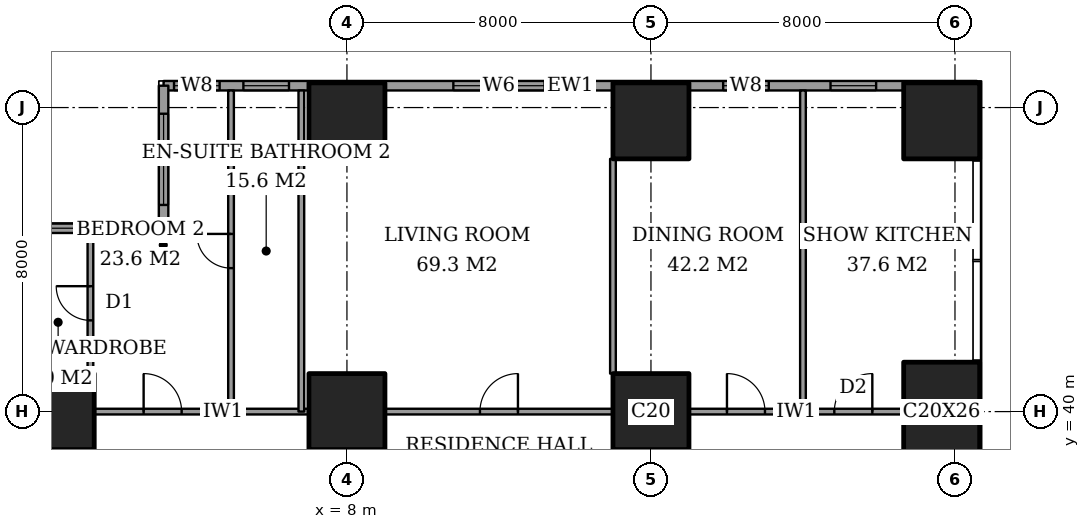
"""IFC4 building model, lengths in metres.
Left out: names, types, materials, properties, quantities, classifications, styles, units other than length and angle.
Written with IfcOpenShell. Run it as: python <this file> out.ifc"""

import sys

from ifc_helpers import new_model, si_unit, direction, frame, frame_2d, origin, origin_2d, place, context, subcontext, project, spatial, rectangle, extrude, element, fill, save


model = new_model("IFC4")
c1 = context("Model", 3, precision=1e-05, world=origin(), true_north=direction((0.0, 1.0)))
c2 = subcontext(c1, "Body", "Model", "MODEL_VIEW")
j1 = project(units=[si_unit("LENGTHUNIT", "METRE"), si_unit("PLANEANGLEUNIT", "RADIAN")], contexts=[c1])
p1 = place(None, origin())
s1 = spatial("IfcSite", under=j1, at=p1, CompositionType="ELEMENT")
p2 = place(p1, origin())
s2 = spatial("IfcBuilding", under=s1, at=p2, CompositionType="ELEMENT")
p3 = place(p2, frame((0.0, 0.0, 65.6)))
s3 = spatial("IfcBuildingStorey", under=s2, at=p3, CompositionType="ELEMENT", Elevation=65.6)
for number, where, z_axis, x_axis in (
    (1, (0.35, 40.0, 0.0), (0.0, 0.0, 1.0), (1.0, 0.0, 0.0)),
    (2, (8.0, 40.0, 0.0), (0.0, 0.0, 1.0), (1.0, 0.0, 0.0)),
    (3, (8.0, 47.65, 0.0), (0.0, 0.0, 1.0), (1.0, 0.0, 0.0)),
    (4, (16.0, 40.0, 0.0), (0.0, 0.0, 1.0), (1.0, 0.0, 0.0)),
    (5, (16.0, 47.65, 0.0), (0.0, 0.0, 1.0), (1.0, 0.0, 0.0)),
):
    element("IfcColumn", number, at=place(p3, frame(where, z_axis=z_axis, x_axis=x_axis)), inside=s3, PredefinedType="COLUMN", context=c2, shape_type="SweptSolid", body=[
        extrude(rectangle(XDim=2.0, YDim=2.0, at=origin_2d()), origin(), (0.0, 0.0, 1.0), 3.6),
    ])
p4 = place(p3, frame((23.65, 40.0, 0.0), z_axis=(0.0, 0.0, 1.0), x_axis=(1.0, 0.0, 0.0)))
e6 = element("IfcColumn", 6, at=p4, inside=s3, PredefinedType="COLUMN", context=c2, shape_type="SweptSolid", body=[
    extrude(rectangle(XDim=2.0, YDim=2.6, at=origin_2d()), origin(), (0.0, 0.0, 1.0), 3.6),
])
p5 = place(p3, frame((23.65, 47.65, 0.0), z_axis=(0.0, 0.0, 1.0), x_axis=(1.0, 0.0, 0.0)))
e7 = element("IfcColumn", 7, at=p5, inside=s3, PredefinedType="COLUMN", context=c2, shape_type="SweptSolid", body=[
    extrude(rectangle(XDim=2.0, YDim=2.0, at=origin_2d()), origin(), (0.0, 0.0, 1.0), 3.6),
])
p6 = place(p3, frame((24.575, 48.575, 0.0), z_axis=(0.0, 0.0, 1.0), x_axis=(-1.0, 0.0, 0.0)))
e8 = element("IfcWall", 8, at=p6, inside=s3, PredefinedType="SOLIDWALL", context=c2, shape_type="SweptSolid", body=[
    extrude(rectangle(XDim=21.4, YDim=0.25, at=frame_2d((10.7, 0.0))), origin(), (0.0, 0.0, 1.0), 3.6),
])
p7 = place(p6, frame((2.65, 0.0, 0.6)))
e9 = element("IfcOpeningElement", 9, at=p7, cuts=e8, PredefinedType="OPENING", context=c2, shape_type="SweptSolid", body=[
    extrude(rectangle(XDim=1.2, YDim=2.0, at=frame_2d((0.6, 1.0))), frame((0.0, 0.135, 0.0), z_axis=(0.0, -1.0, 0.0), x_axis=(1.0, 0.0, 0.0)), (0.0, 0.0, 1.0), 0.27),
])
p8 = place(p6, frame((5.475, 0.0, 0.6)))
e10 = element("IfcOpeningElement", 10, at=p8, cuts=e8, PredefinedType="OPENING", context=c2, shape_type="SweptSolid", body=[
    extrude(rectangle(XDim=1.2, YDim=2.0, at=frame_2d((0.6, 1.0))), frame((0.0, 0.135, 0.0), z_axis=(0.0, -1.0, 0.0), x_axis=(1.0, 0.0, 0.0)), (0.0, 0.0, 1.0), 0.27),
])
p9 = place(p6, frame((11.375, 0.0, 0.6)))
e11 = element("IfcOpeningElement", 11, at=p9, cuts=e8, PredefinedType="OPENING", context=c2, shape_type="SweptSolid", body=[
    extrude(rectangle(XDim=2.4, YDim=2.0, at=frame_2d((1.2, 1.0))), frame((0.0, 0.135, 0.0), z_axis=(0.0, -1.0, 0.0), x_axis=(1.0, 0.0, 0.0)), (0.0, 0.0, 1.0), 0.27),
])
p10 = place(p6, frame((18.1, 0.0, 0.6)))
e12 = element("IfcOpeningElement", 12, at=p10, cuts=e8, PredefinedType="OPENING", context=c2, shape_type="SweptSolid", body=[
    extrude(rectangle(XDim=1.2, YDim=2.0, at=frame_2d((0.6, 1.0))), frame((0.0, 0.135, 0.0), z_axis=(0.0, -1.0, 0.0), x_axis=(1.0, 0.0, 0.0)), (0.0, 0.0, 1.0), 0.27),
])
p11 = place(p6, frame((19.925, 0.0, 0.6)))
e13 = element("IfcOpeningElement", 13, at=p11, cuts=e8, PredefinedType="OPENING", context=c2, shape_type="SweptSolid", body=[
    extrude(rectangle(XDim=1.2, YDim=2.0, at=frame_2d((0.6, 1.0))), frame((0.0, 0.135, 0.0), z_axis=(0.0, -1.0, 0.0), x_axis=(1.0, 0.0, 0.0)), (0.0, 0.0, 1.0), 0.27),
])
p12 = place(p3, frame((3.175, 48.575, 0.0), z_axis=(0.0, 0.0, 1.0), x_axis=(0.0, -1.0, 0.0)))
e14 = element("IfcWall", 14, at=p12, inside=s3, PredefinedType="SOLIDWALL", context=c2, shape_type="SweptSolid", body=[
    extrude(rectangle(XDim=3.75, YDim=0.25, at=frame_2d((1.875, 0.0))), origin(), (0.0, 0.0, 1.0), 3.6),
])
p13 = place(p12, frame((0.738, 0.0, 0.6)))
e15 = element("IfcOpeningElement", 15, at=p13, cuts=e14, PredefinedType="OPENING", context=c2, shape_type="SweptSolid", body=[
    extrude(rectangle(XDim=2.4, YDim=2.0, at=frame_2d((1.2, 1.0))), frame((0.0, 0.135, 0.0), z_axis=(0.0, -1.0, 0.0), x_axis=(1.0, 0.0, 0.0)), (0.0, 0.0, 1.0), 0.27),
])
p14 = place(p3, frame((3.175, 44.825, 0.0), z_axis=(0.0, 0.0, 1.0), x_axis=(-1.0, 0.0, 0.0)))
e16 = element("IfcWall", 16, at=p14, inside=s3, PredefinedType="SOLIDWALL", context=c2, shape_type="SweptSolid", body=[
    extrude(rectangle(XDim=3.75, YDim=0.25, at=frame_2d((1.875, 0.0))), origin(), (0.0, 0.0, 1.0), 3.6),
])
p15 = place(p14, frame((0.363, 0.0, 0.6)))
e17 = element("IfcOpeningElement", 17, at=p15, cuts=e16, PredefinedType="OPENING", context=c2, shape_type="SweptSolid", body=[
    extrude(rectangle(XDim=1.2, YDim=2.0, at=frame_2d((0.6, 1.0))), frame((0.0, 0.135, 0.0), z_axis=(0.0, -1.0, 0.0), x_axis=(1.0, 0.0, 0.0)), (0.0, 0.0, 1.0), 0.27),
])
p16 = place(p14, frame((2.25, 0.0, 0.6)))
e18 = element("IfcOpeningElement", 18, at=p16, cuts=e16, PredefinedType="OPENING", context=c2, shape_type="SweptSolid", body=[
    extrude(rectangle(XDim=1.2, YDim=2.0, at=frame_2d((0.6, 1.0))), frame((0.0, 0.135, 0.0), z_axis=(0.0, -1.0, 0.0), x_axis=(1.0, 0.0, 0.0)), (0.0, 0.0, 1.0), 0.27),
])
p17 = place(p3, frame((1.35, 40.0, 0.0), z_axis=(0.0, 0.0, 1.0), x_axis=(1.0, 0.0, 0.0)))
e19 = element("IfcWall", 19, at=p17, inside=s3, PredefinedType="PARTITIONING", context=c2, shape_type="SweptSolid", body=[
    extrude(rectangle(XDim=5.65, YDim=0.15, at=frame_2d((2.825, 0.0))), origin(), (0.0, 0.0, 1.0), 3.35),
])
p18 = place(p17, frame((1.3, 0.0, 0.0)))
e20 = element("IfcOpeningElement", 20, at=p18, cuts=e19, PredefinedType="OPENING", context=c2, shape_type="SweptSolid", body=[
    extrude(rectangle(XDim=1.0, YDim=2.1, at=frame_2d((0.5, 1.05))), frame((0.0, 0.085, 0.0), z_axis=(0.0, -1.0, 0.0), x_axis=(1.0, 0.0, 0.0)), (0.0, 0.0, 1.0), 0.17),
])
p19 = place(p3, frame((9.0, 40.0, 0.0), z_axis=(0.0, 0.0, 1.0), x_axis=(1.0, 0.0, 0.0)))
e21 = element("IfcWall", 21, at=p19, inside=s3, PredefinedType="PARTITIONING", context=c2, shape_type="SweptSolid", body=[
    extrude(rectangle(XDim=6.0, YDim=0.15, at=frame_2d((3.0, 0.0))), origin(), (0.0, 0.0, 1.0), 3.35),
])
p20 = place(p19, frame((2.5, 0.0, 0.0)))
e22 = element("IfcOpeningElement", 22, at=p20, cuts=e21, PredefinedType="OPENING", context=c2, shape_type="SweptSolid", body=[
    extrude(rectangle(XDim=1.0, YDim=2.1, at=frame_2d((0.5, 1.05))), frame((0.0, 0.085, 0.0), z_axis=(0.0, -1.0, 0.0), x_axis=(1.0, 0.0, 0.0)), (0.0, 0.0, 1.0), 0.17),
])
p21 = place(p3, frame((17.0, 40.0, 0.0), z_axis=(0.0, 0.0, 1.0), x_axis=(1.0, 0.0, 0.0)))
e23 = element("IfcWall", 23, at=p21, inside=s3, PredefinedType="PARTITIONING", context=c2, shape_type="SweptSolid", body=[
    extrude(rectangle(XDim=5.65, YDim=0.15, at=frame_2d((2.825, 0.0))), origin(), (0.0, 0.0, 1.0), 3.35),
])
p22 = place(p21, frame((1.0, 0.0, 0.0)))
e24 = element("IfcOpeningElement", 24, at=p22, cuts=e23, PredefinedType="OPENING", context=c2, shape_type="SweptSolid", body=[
    extrude(rectangle(XDim=1.0, YDim=2.1, at=frame_2d((0.5, 1.05))), frame((0.0, 0.085, 0.0), z_axis=(0.0, -1.0, 0.0), x_axis=(1.0, 0.0, 0.0)), (0.0, 0.0, 1.0), 0.17),
])
p23 = place(p21, frame((3.825, 0.0, 0.0)))
e25 = element("IfcOpeningElement", 25, at=p23, cuts=e23, PredefinedType="OPENING", context=c2, shape_type="SweptSolid", body=[
    extrude(rectangle(XDim=1.0, YDim=2.1, at=frame_2d((0.5, 1.05))), frame((0.0, 0.085, 0.0), z_axis=(0.0, -1.0, 0.0), x_axis=(1.0, 0.0, 0.0)), (0.0, 0.0, 1.0), 0.17),
])
p24 = place(p3, frame((1.25, 41.0, 0.0), z_axis=(0.0, 0.0, 1.0), x_axis=(0.0, 1.0, 0.0)))
e26 = element("IfcWall", 26, at=p24, inside=s3, PredefinedType="PARTITIONING", context=c2, shape_type="SweptSolid", body=[
    extrude(rectangle(XDim=3.7, YDim=0.15, at=frame_2d((1.85, 0.0))), origin(), (0.0, 0.0, 1.0), 3.35),
])
p25 = place(p24, frame((1.4, 0.0, 0.0)))
e27 = element("IfcOpeningElement", 27, at=p25, cuts=e26, PredefinedType="OPENING", context=c2, shape_type="SweptSolid", body=[
    extrude(rectangle(XDim=0.9, YDim=2.1, at=frame_2d((0.45, 1.05))), frame((0.0, 0.085, 0.0), z_axis=(0.0, -1.0, 0.0), x_axis=(1.0, 0.0, 0.0)), (0.0, 0.0, 1.0), 0.17),
])
p26 = place(p3, frame((4.95, 40.0, 0.0), z_axis=(0.0, 0.0, 1.0), x_axis=(0.0, 1.0, 0.0)))
e28 = element("IfcWall", 28, at=p26, inside=s3, PredefinedType="PARTITIONING", context=c2, shape_type="SweptSolid", body=[
    extrude(rectangle(XDim=8.45, YDim=0.15, at=frame_2d((4.225, 0.0))), origin(), (0.0, 0.0, 1.0), 3.35),
])
p27 = place(p26, frame((3.775, 0.0, 0.0)))
e29 = element("IfcOpeningElement", 29, at=p27, cuts=e28, PredefinedType="OPENING", context=c2, shape_type="SweptSolid", body=[
    extrude(rectangle(XDim=0.9, YDim=2.1, at=frame_2d((0.45, 1.05))), frame((0.0, 0.085, 0.0), z_axis=(0.0, -1.0, 0.0), x_axis=(1.0, 0.0, 0.0)), (0.0, 0.0, 1.0), 0.17),
])
p28 = place(p3, frame((6.8, 40.0, 0.0), z_axis=(0.0, 0.0, 1.0), x_axis=(0.0, 1.0, 0.0)))
e30 = element("IfcWall", 30, at=p28, inside=s3, PredefinedType="PARTITIONING", context=c2, shape_type="SweptSolid", body=[
    extrude(rectangle(XDim=8.45, YDim=0.15, at=frame_2d((4.225, 0.0))), origin(), (0.0, 0.0, 1.0), 3.35),
])
p29 = place(p3, frame((15.0, 41.0, 0.0), z_axis=(0.0, 0.0, 1.0), x_axis=(0.0, 1.0, 0.0)))
e31 = element("IfcWall", 31, at=p29, inside=s3, PredefinedType="PARTITIONING", context=c2, shape_type="SweptSolid", body=[
    extrude(rectangle(XDim=5.65, YDim=0.15, at=frame_2d((2.825, 0.0))), origin(), (0.0, 0.0, 1.0), 3.35),
])
p30 = place(p3, frame((20.0, 40.0, 0.0), z_axis=(0.0, 0.0, 1.0), x_axis=(0.0, 1.0, 0.0)))
e32 = element("IfcWall", 32, at=p30, inside=s3, PredefinedType="PARTITIONING", context=c2, shape_type="SweptSolid", body=[
    extrude(rectangle(XDim=8.45, YDim=0.15, at=frame_2d((4.225, 0.0))), origin(), (0.0, 0.0, 1.0), 3.35),
])
p31 = place(p7, origin())
e33 = element("IfcWindow", 33, at=p31, inside=s3, PartitioningType="SINGLE_PANEL", PredefinedType="WINDOW", context=c2, shape_type="SweptSolid", body=[
    extrude(rectangle(XDim=1.2, YDim=2.0, at=frame_2d((0.6, 1.0))), frame((0.0, 0.03, 0.0), z_axis=(0.0, -1.0, 0.0), x_axis=(1.0, 0.0, 0.0)), (0.0, 0.0, 1.0), 0.06),
])
fill(e9, e33)
p32 = place(p8, origin())
e34 = element("IfcWindow", 34, at=p32, inside=s3, PartitioningType="SINGLE_PANEL", PredefinedType="WINDOW", context=c2, shape_type="SweptSolid", body=[
    extrude(rectangle(XDim=1.2, YDim=2.0, at=frame_2d((0.6, 1.0))), frame((0.0, 0.03, 0.0), z_axis=(0.0, -1.0, 0.0), x_axis=(1.0, 0.0, 0.0)), (0.0, 0.0, 1.0), 0.06),
])
fill(e10, e34)
p33 = place(p9, origin())
e35 = element("IfcWindow", 35, at=p33, inside=s3, PartitioningType="SINGLE_PANEL", PredefinedType="WINDOW", context=c2, shape_type="SweptSolid", body=[
    extrude(rectangle(XDim=2.4, YDim=2.0, at=frame_2d((1.2, 1.0))), frame((0.0, 0.03, 0.0), z_axis=(0.0, -1.0, 0.0), x_axis=(1.0, 0.0, 0.0)), (0.0, 0.0, 1.0), 0.06),
])
fill(e11, e35)
p34 = place(p10, origin())
e36 = element("IfcWindow", 36, at=p34, inside=s3, PartitioningType="SINGLE_PANEL", PredefinedType="WINDOW", context=c2, shape_type="SweptSolid", body=[
    extrude(rectangle(XDim=1.2, YDim=2.0, at=frame_2d((0.6, 1.0))), frame((0.0, 0.03, 0.0), z_axis=(0.0, -1.0, 0.0), x_axis=(1.0, 0.0, 0.0)), (0.0, 0.0, 1.0), 0.06),
])
fill(e12, e36)
p35 = place(p11, origin())
e37 = element("IfcWindow", 37, at=p35, inside=s3, PartitioningType="SINGLE_PANEL", PredefinedType="WINDOW", context=c2, shape_type="SweptSolid", body=[
    extrude(rectangle(XDim=1.2, YDim=2.0, at=frame_2d((0.6, 1.0))), frame((0.0, 0.03, 0.0), z_axis=(0.0, -1.0, 0.0), x_axis=(1.0, 0.0, 0.0)), (0.0, 0.0, 1.0), 0.06),
])
fill(e13, e37)
p36 = place(p13, origin())
e38 = element("IfcWindow", 38, at=p36, inside=s3, PartitioningType="SINGLE_PANEL", PredefinedType="WINDOW", context=c2, shape_type="SweptSolid", body=[
    extrude(rectangle(XDim=2.4, YDim=2.0, at=frame_2d((1.2, 1.0))), frame((0.0, 0.03, 0.0), z_axis=(0.0, -1.0, 0.0), x_axis=(1.0, 0.0, 0.0)), (0.0, 0.0, 1.0), 0.06),
])
fill(e15, e38)
p37 = place(p15, origin())
e39 = element("IfcWindow", 39, at=p37, inside=s3, PartitioningType="SINGLE_PANEL", PredefinedType="WINDOW", context=c2, shape_type="SweptSolid", body=[
    extrude(rectangle(XDim=1.2, YDim=2.0, at=frame_2d((0.6, 1.0))), frame((0.0, 0.03, 0.0), z_axis=(0.0, -1.0, 0.0), x_axis=(1.0, 0.0, 0.0)), (0.0, 0.0, 1.0), 0.06),
])
fill(e17, e39)
p38 = place(p16, origin())
e40 = element("IfcWindow", 40, at=p38, inside=s3, PartitioningType="SINGLE_PANEL", PredefinedType="WINDOW", context=c2, shape_type="SweptSolid", body=[
    extrude(rectangle(XDim=1.2, YDim=2.0, at=frame_2d((0.6, 1.0))), frame((0.0, 0.03, 0.0), z_axis=(0.0, -1.0, 0.0), x_axis=(1.0, 0.0, 0.0)), (0.0, 0.0, 1.0), 0.06),
])
fill(e18, e40)
p39 = place(p25, origin())
e41 = element("IfcDoor", 41, at=p39, inside=s3, OperationType="SINGLE_SWING_LEFT", PredefinedType="DOOR", context=c2, shape_type="SweptSolid", body=[
    extrude(rectangle(XDim=0.9, YDim=2.1, at=frame_2d((0.45, 1.05))), frame((0.0, 0.025, 0.0), z_axis=(0.0, -1.0, 0.0), x_axis=(1.0, 0.0, 0.0)), (0.0, 0.0, 1.0), 0.05),
])
fill(e27, e41)
p40 = place(p18, origin())
e42 = element("IfcDoor", 42, at=p40, inside=s3, OperationType="SINGLE_SWING_RIGHT", PredefinedType="DOOR", context=c2, shape_type="SweptSolid", body=[
    extrude(rectangle(XDim=1.0, YDim=2.1, at=frame_2d((0.5, 1.05))), frame((0.0, 0.025, 0.0), z_axis=(0.0, -1.0, 0.0), x_axis=(1.0, 0.0, 0.0)), (0.0, 0.0, 1.0), 0.05),
])
fill(e20, e42)
p41 = place(p27, origin())
e43 = element("IfcDoor", 43, at=p41, inside=s3, OperationType="SINGLE_SWING_LEFT", PredefinedType="DOOR", context=c2, shape_type="SweptSolid", body=[
    extrude(rectangle(XDim=0.9, YDim=2.1, at=frame_2d((0.45, 1.05))), frame((0.0, 0.025, 0.0), z_axis=(0.0, -1.0, 0.0), x_axis=(1.0, 0.0, 0.0)), (0.0, 0.0, 1.0), 0.05),
])
fill(e29, e43)
p42 = place(p20, origin())
e44 = element("IfcDoor", 44, at=p42, inside=s3, OperationType="SINGLE_SWING_LEFT", PredefinedType="DOOR", context=c2, shape_type="SweptSolid", body=[
    extrude(rectangle(XDim=1.0, YDim=2.1, at=frame_2d((0.5, 1.05))), frame((0.0, 0.025, 0.0), z_axis=(0.0, -1.0, 0.0), x_axis=(1.0, 0.0, 0.0)), (0.0, 0.0, 1.0), 0.05),
])
fill(e22, e44)
p43 = place(p22, origin())
e45 = element("IfcDoor", 45, at=p43, inside=s3, OperationType="SINGLE_SWING_RIGHT", PredefinedType="DOOR", context=c2, shape_type="SweptSolid", body=[
    extrude(rectangle(XDim=1.0, YDim=2.1, at=frame_2d((0.5, 1.05))), frame((0.0, 0.025, 0.0), z_axis=(0.0, -1.0, 0.0), x_axis=(1.0, 0.0, 0.0)), (0.0, 0.0, 1.0), 0.05),
])
fill(e24, e45)
p44 = place(p23, origin())
e46 = element("IfcDoor", 46, at=p44, inside=s3, OperationType="SINGLE_SWING_LEFT", PredefinedType="DOOR", context=c2, shape_type="SweptSolid", body=[
    extrude(rectangle(XDim=1.0, YDim=2.1, at=frame_2d((0.5, 1.05))), frame((0.0, 0.025, 0.0), z_axis=(0.0, -1.0, 0.0), x_axis=(1.0, 0.0, 0.0)), (0.0, 0.0, 1.0), 0.05),
])
fill(e25, e46)
save(model, sys.argv[1])
